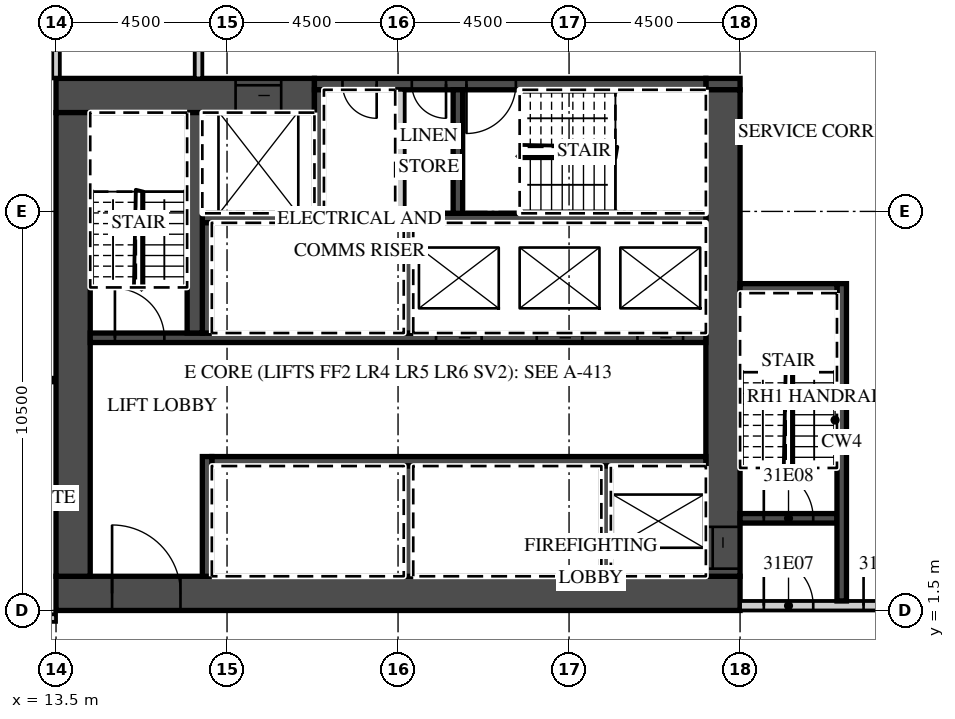
"""IFC4 building model, lengths in metres.
Left out: names, types, materials, properties, quantities, classifications, styles, units other than length and angle.
Written with IfcOpenShell. Run it as: python <this file> out.ifc"""

import sys

from ifc_helpers import new_model, si_unit, direction, frame, frame_2d, origin, place, context, subcontext, project, spatial, rectangle, extrude, element, fill, save


model = new_model("IFC4")
c1 = context("Model", 3, precision=1e-05, world=origin(), true_north=direction((0.0, 1.0)))
c2 = subcontext(c1, "Body", "Model", "MODEL_VIEW")
j1 = project(units=[si_unit("LENGTHUNIT", "METRE"), si_unit("PLANEANGLEUNIT", "RADIAN")], contexts=[c1])
p1 = place(None, origin())
s1 = spatial("IfcSite", under=j1, at=p1, CompositionType="ELEMENT")
p2 = place(p1, origin())
s2 = spatial("IfcBuilding", under=s1, at=p2, CompositionType="ELEMENT")
p3 = place(p2, frame((0.0, 0.0, 137.2)))
s3 = spatial("IfcBuildingStorey", under=s2, at=p3, CompositionType="ELEMENT", Elevation=137.2)
p4 = place(p3, frame((13.5, 15.5, 0.0), z_axis=(0.0, 0.0, 1.0), x_axis=(0.0, 1.0, 0.0)))
e1 = element("IfcWall", 1, at=p4, inside=s3, PredefinedType="PARTITIONING", context=c2, shape_type="SweptSolid", body=[
    extrude(rectangle(XDim=7.162, YDim=0.2, at=frame_2d((3.581, 0.0))), origin(), (0.0, 0.0, 1.0), 3.02),
])
p5 = place(p3, frame((-39.316, 1.3, 0.0), z_axis=(0.0, 0.0, 1.0), x_axis=(1.0, 0.0, 0.0)))
e2 = element("IfcWall", 2, at=p5, inside=s3, PredefinedType="PARTITIONING", context=c2, shape_type="SweptSolid", body=[
    extrude(rectangle(XDim=52.816, YDim=0.2, at=frame_2d((26.408, 0.0))), origin(), (0.0, 0.0, 1.0), 3.02),
])
p6 = place(p5, frame((0.15, 0.0, 0.0)))
e3 = element("IfcOpeningElement", 3, at=p6, cuts=e2, PredefinedType="OPENING", context=c2, shape_type="SweptSolid", body=[
    extrude(rectangle(XDim=0.9, YDim=2.1, at=frame_2d((0.45, 1.05))), frame((0.0, 0.11, 0.0), z_axis=(0.0, -1.0, 0.0), x_axis=(1.0, 0.0, 0.0)), (0.0, 0.0, 1.0), 0.22),
])
p7 = place(p5, frame((8.679, 0.0, 0.0)))
e4 = element("IfcOpeningElement", 4, at=p7, cuts=e2, PredefinedType="OPENING", context=c2, shape_type="SweptSolid", body=[
    extrude(rectangle(XDim=1.2, YDim=2.1, at=frame_2d((0.6, 1.05))), frame((0.0, 0.11, 0.0), z_axis=(0.0, -1.0, 0.0), x_axis=(1.0, 0.0, 0.0)), (0.0, 0.0, 1.0), 0.22),
])
p8 = place(p5, frame((17.678, 0.0, 0.0)))
e5 = element("IfcOpeningElement", 5, at=p8, cuts=e2, PredefinedType="OPENING", context=c2, shape_type="SweptSolid", body=[
    extrude(rectangle(XDim=1.2, YDim=2.1, at=frame_2d((0.6, 1.05))), frame((0.0, 0.11, 0.0), z_axis=(0.0, -1.0, 0.0), x_axis=(1.0, 0.0, 0.0)), (0.0, 0.0, 1.0), 0.22),
])
p9 = place(p5, frame((23.754, 0.0, 0.0)))
e6 = element("IfcOpeningElement", 6, at=p9, cuts=e2, PredefinedType="OPENING", context=c2, shape_type="SweptSolid", body=[
    extrude(rectangle(XDim=1.2, YDim=2.1, at=frame_2d((0.6, 1.05))), frame((0.0, 0.11, 0.0), z_axis=(0.0, -1.0, 0.0), x_axis=(1.0, 0.0, 0.0)), (0.0, 0.0, 1.0), 0.22),
])
p10 = place(p5, frame((30.891, 0.0, 0.0)))
e7 = element("IfcOpeningElement", 7, at=p10, cuts=e2, PredefinedType="OPENING", context=c2, shape_type="SweptSolid", body=[
    extrude(rectangle(XDim=1.0, YDim=2.1, at=frame_2d((0.5, 1.05))), frame((0.0, 0.11, 0.0), z_axis=(0.0, -1.0, 0.0), x_axis=(1.0, 0.0, 0.0)), (0.0, 0.0, 1.0), 0.22),
])
p11 = place(p5, frame((37.741, 0.0, 0.0)))
e8 = element("IfcOpeningElement", 8, at=p11, cuts=e2, PredefinedType="OPENING", context=c2, shape_type="SweptSolid", body=[
    extrude(rectangle(XDim=1.0, YDim=2.1, at=frame_2d((0.5, 1.05))), frame((0.0, 0.11, 0.0), z_axis=(0.0, -1.0, 0.0), x_axis=(1.0, 0.0, 0.0)), (0.0, 0.0, 1.0), 0.22),
])
p12 = place(p5, frame((41.754, 0.0, 0.0)))
e9 = element("IfcOpeningElement", 9, at=p12, cuts=e2, PredefinedType="OPENING", context=c2, shape_type="SweptSolid", body=[
    extrude(rectangle(XDim=1.2, YDim=2.1, at=frame_2d((0.6, 1.05))), frame((0.0, 0.11, 0.0), z_axis=(0.0, -1.0, 0.0), x_axis=(1.0, 0.0, 0.0)), (0.0, 0.0, 1.0), 0.22),
])
p13 = place(p5, frame((48.891, 0.0, 0.0)))
e10 = element("IfcOpeningElement", 10, at=p13, cuts=e2, PredefinedType="OPENING", context=c2, shape_type="SweptSolid", body=[
    extrude(rectangle(XDim=1.0, YDim=2.1, at=frame_2d((0.5, 1.05))), frame((0.0, 0.11, 0.0), z_axis=(0.0, -1.0, 0.0), x_axis=(1.0, 0.0, 0.0)), (0.0, 0.0, 1.0), 0.22),
])
p14 = place(p3, frame((13.5, 1.95, 0.0), z_axis=(0.0, 0.0, 1.0), x_axis=(1.0, 0.0, 0.0)))
e11 = element("IfcWall", 11, at=p14, inside=s3, PredefinedType="SHEAR", context=c2, shape_type="SweptSolid", body=[
    extrude(rectangle(XDim=18.0, YDim=0.9, at=frame_2d((9.0, 0.0))), origin(), (0.0, 0.0, 1.0), 3.02),
])
p15 = place(p14, frame((1.475, 0.0, 0.0)))
e12 = element("IfcOpeningElement", 12, at=p15, cuts=e11, PredefinedType="OPENING", context=c2, shape_type="SweptSolid", body=[
    extrude(rectangle(XDim=1.8, YDim=2.1, at=frame_2d((0.9, 1.05))), frame((0.0, 0.46, 0.0), z_axis=(0.0, -1.0, 0.0), x_axis=(1.0, 0.0, 0.0)), (0.0, 0.0, 1.0), 0.92),
])
p16 = place(p3, frame((13.5, 15.05, 0.0), z_axis=(0.0, 0.0, 1.0), x_axis=(1.0, 0.0, 0.0)))
e13 = element("IfcWall", 13, at=p16, inside=s3, PredefinedType="SHEAR", context=c2, shape_type="SweptSolid", body=[
    extrude(rectangle(XDim=6.8, YDim=0.9, at=frame_2d((3.4, 0.0))), origin(), (0.0, 0.0, 1.0), 3.02),
])
p17 = place(p16, frame((4.725, 0.0, 0.0)))
e14 = element("IfcOpeningElement", 14, at=p17, cuts=e13, PredefinedType="OPENING", context=c2, shape_type="SweptSolid", body=[
    extrude(rectangle(XDim=1.2, YDim=2.1, at=frame_2d((0.6, 1.05))), frame((0.0, 0.46, 0.0), z_axis=(0.0, -1.0, 0.0), x_axis=(1.0, 0.0, 0.0)), (0.0, 0.0, 1.0), 0.92),
])
p18 = place(p3, frame((30.6, 15.35, 0.0), z_axis=(0.0, 0.0, 1.0), x_axis=(1.0, 0.0, 0.0)))
e15 = element("IfcWall", 15, at=p18, inside=s3, PredefinedType="SHEAR", context=c2, shape_type="SweptSolid", body=[
    extrude(rectangle(XDim=0.9, YDim=0.3, at=frame_2d((0.45, 0.0))), origin(), (0.0, 0.0, 1.0), 3.02),
])
p19 = place(p3, frame((20.3, 15.35, 0.0), z_axis=(0.0, 0.0, 1.0), x_axis=(1.0, 0.0, 0.0)))
e16 = element("IfcWall", 16, at=p19, inside=s3, PredefinedType="SHEAR", context=c2, shape_type="SweptSolid", body=[
    extrude(rectangle(XDim=10.3, YDim=0.3, at=frame_2d((5.15, 0.0))), origin(), (0.0, 0.0, 1.0), 3.02),
])
p20 = place(p19, frame((4.0, 0.0, 0.0)))
e17 = element("IfcOpeningElement", 17, at=p20, cuts=e16, PredefinedType="OPENING", context=c2, shape_type="SweptSolid", body=[
    extrude(rectangle(XDim=1.3, YDim=2.1, at=frame_2d((0.65, 1.05))), frame((0.0, 0.16, 0.0), z_axis=(0.0, -1.0, 0.0), x_axis=(1.0, 0.0, 0.0)), (0.0, 0.0, 1.0), 0.32),
])
p21 = place(p19, frame((2.562, 0.0, 0.0)))
e18 = element("IfcOpeningElement", 18, at=p21, cuts=e16, PredefinedType="OPENING", context=c2, shape_type="SweptSolid", body=[
    extrude(rectangle(XDim=0.9, YDim=2.1, at=frame_2d((0.45, 1.05))), frame((0.0, 0.16, 0.0), z_axis=(0.0, -1.0, 0.0), x_axis=(1.0, 0.0, 0.0)), (0.0, 0.0, 1.0), 0.32),
])
p22 = place(p19, frame((0.738, 0.0, 0.0)))
e19 = element("IfcOpeningElement", 19, at=p22, cuts=e16, PredefinedType="OPENING", context=c2, shape_type="SweptSolid", body=[
    extrude(rectangle(XDim=0.9, YDim=2.1, at=frame_2d((0.45, 1.05))), frame((0.0, 0.16, 0.0), z_axis=(0.0, -1.0, 0.0), x_axis=(1.0, 0.0, 0.0)), (0.0, 0.0, 1.0), 0.32),
])
p23 = place(p3, frame((31.05, 2.4, 0.0), z_axis=(0.0, 0.0, 1.0), x_axis=(0.0, 1.0, 0.0)))
e20 = element("IfcWall", 20, at=p23, inside=s3, PredefinedType="SHEAR", context=c2, shape_type="SweptSolid", body=[
    extrude(rectangle(XDim=12.8, YDim=0.9, at=frame_2d((6.4, 0.0))), origin(), (0.0, 0.0, 1.0), 3.02),
])
p24 = place(p23, frame((0.2, 0.0, 0.0)))
e21 = element("IfcOpeningElement", 21, at=p24, cuts=e20, PredefinedType="OPENING", context=c2, shape_type="SweptSolid", body=[
    extrude(rectangle(XDim=1.1, YDim=2.1, at=frame_2d((0.55, 1.05))), frame((0.0, 0.46, 0.0), z_axis=(0.0, -1.0, 0.0), x_axis=(1.0, 0.0, 0.0)), (0.0, 0.0, 1.0), 0.92),
])
p25 = place(p3, frame((13.95, 2.4, 0.0), z_axis=(0.0, 0.0, 1.0), x_axis=(0.0, 1.0, 0.0)))
e22 = element("IfcWall", 22, at=p25, inside=s3, PredefinedType="SHEAR", context=c2, shape_type="SweptSolid", body=[
    extrude(rectangle(XDim=12.2, YDim=0.9, at=frame_2d((6.1, 0.0))), origin(), (0.0, 0.0, 1.0), 3.02),
])
p26 = place(p3, frame((17.6, 5.425, 0.0), z_axis=(0.0, 0.0, 1.0), x_axis=(1.0, 0.0, 0.0)))
e23 = element("IfcWall", 23, at=p26, inside=s3, PredefinedType="SHEAR", context=c2, shape_type="SweptSolid", body=[
    extrude(rectangle(XDim=13.0, YDim=0.25, at=frame_2d((6.5, 0.0))), origin(), (0.0, 0.0, 1.0), 3.02),
])
p27 = place(p3, frame((17.475, 2.4, 0.0), z_axis=(0.0, 0.0, 1.0), x_axis=(0.0, 1.0, 0.0)))
e24 = element("IfcWall", 24, at=p27, inside=s3, PredefinedType="SHEAR", context=c2, shape_type="SweptSolid", body=[
    extrude(rectangle(XDim=3.15, YDim=0.25, at=frame_2d((1.575, 0.0))), origin(), (0.0, 0.0, 1.0), 3.02),
])
for number, where, z_axis, x_axis in (
    (25, (27.975, 2.4, 0.0), (0.0, 0.0, 1.0), (0.0, 1.0, 0.0)),
    (26, (22.775, 2.4, 0.0), (0.0, 0.0, 1.0), (0.0, 1.0, 0.0)),
):
    element("IfcWall", number, at=place(p3, frame(where, z_axis=z_axis, x_axis=x_axis)), inside=s3, PredefinedType="SHEAR", context=c2, shape_type="SweptSolid", body=[
        extrude(rectangle(XDim=2.9, YDim=0.25, at=frame_2d((1.45, 0.0))), origin(), (0.0, 0.0, 1.0), 3.02),
    ])
p28 = place(p3, frame((14.4, 8.675, 0.0), z_axis=(0.0, 0.0, 1.0), x_axis=(1.0, 0.0, 0.0)))
e27 = element("IfcWall", 27, at=p28, inside=s3, PredefinedType="SHEAR", context=c2, shape_type="SweptSolid", body=[
    extrude(rectangle(XDim=16.2, YDim=0.25, at=frame_2d((8.1, 0.0))), origin(), (0.0, 0.0, 1.0), 3.02),
])
p29 = place(p28, frame((14.4, 0.0, 0.0)))
e28 = element("IfcOpeningElement", 28, at=p29, cuts=e27, PredefinedType="OPENING", context=c2, shape_type="SweptSolid", body=[
    extrude(rectangle(XDim=1.2, YDim=2.1, at=frame_2d((0.6, 1.05))), frame((0.0, 0.135, 0.0), z_axis=(0.0, -1.0, 0.0), x_axis=(1.0, 0.0, 0.0)), (0.0, 0.0, 1.0), 0.27),
])
p30 = place(p28, frame((11.75, 0.0, 0.0)))
e29 = element("IfcOpeningElement", 29, at=p30, cuts=e27, PredefinedType="OPENING", context=c2, shape_type="SweptSolid", body=[
    extrude(rectangle(XDim=1.2, YDim=2.1, at=frame_2d((0.6, 1.05))), frame((0.0, 0.135, 0.0), z_axis=(0.0, -1.0, 0.0), x_axis=(1.0, 0.0, 0.0)), (0.0, 0.0, 1.0), 0.27),
])
p31 = place(p28, frame((9.1, 0.0, 0.0)))
e30 = element("IfcOpeningElement", 30, at=p31, cuts=e27, PredefinedType="OPENING", context=c2, shape_type="SweptSolid", body=[
    extrude(rectangle(XDim=1.2, YDim=2.1, at=frame_2d((0.6, 1.05))), frame((0.0, 0.135, 0.0), z_axis=(0.0, -1.0, 0.0), x_axis=(1.0, 0.0, 0.0)), (0.0, 0.0, 1.0), 0.27),
])
p32 = place(p28, frame((0.65, 0.0, 0.0)))
e31 = element("IfcOpeningElement", 31, at=p32, cuts=e27, PredefinedType="OPENING", context=c2, shape_type="SweptSolid", body=[
    extrude(rectangle(XDim=1.3, YDim=2.1, at=frame_2d((0.65, 1.05))), frame((0.0, 0.135, 0.0), z_axis=(0.0, -1.0, 0.0), x_axis=(1.0, 0.0, 0.0)), (0.0, 0.0, 1.0), 0.27),
])
p33 = place(p3, frame((17.35, 11.825, 0.0), z_axis=(0.0, 0.0, 1.0), x_axis=(1.0, 0.0, 0.0)))
e32 = element("IfcWall", 32, at=p33, inside=s3, PredefinedType="SHEAR", context=c2, shape_type="SweptSolid", body=[
    extrude(rectangle(XDim=13.25, YDim=0.25, at=frame_2d((6.625, 0.0))), origin(), (0.0, 0.0, 1.0), 3.02),
])
for number, where, z_axis, x_axis in (
    (33, (17.475, 8.8, 0.0), (0.0, 0.0, 1.0), (0.0, 1.0, 0.0)),
    (34, (22.775, 8.8, 0.0), (0.0, 0.0, 1.0), (0.0, 1.0, 0.0)),
):
    element("IfcWall", number, at=place(p3, frame(where, z_axis=z_axis, x_axis=x_axis)), inside=s3, PredefinedType="SHEAR", context=c2, shape_type="SweptSolid", body=[
        extrude(rectangle(XDim=2.9, YDim=0.25, at=frame_2d((1.45, 0.0))), origin(), (0.0, 0.0, 1.0), 3.02),
    ])
p34 = place(p3, frame((17.15, 8.8, 0.0), z_axis=(0.0, 0.0, 1.0), x_axis=(0.0, 1.0, 0.0)))
e35 = element("IfcWall", 35, at=p34, inside=s3, PredefinedType="SHEAR", context=c2, shape_type="SweptSolid", body=[
    extrude(rectangle(XDim=5.8, YDim=0.4, at=frame_2d((2.9, 0.0))), origin(), (0.0, 0.0, 1.0), 3.02),
])
for number, where, z_axis, x_axis in (
    (36, (20.425, 11.95, 0.0), (0.0, 0.0, 1.0), (0.0, 1.0, 0.0)),
    (37, (24.075, 11.95, 0.0), (0.0, 0.0, 1.0), (0.0, 1.0, 0.0)),
):
    element("IfcWall", number, at=place(p3, frame(where, z_axis=z_axis, x_axis=x_axis)), inside=s3, PredefinedType="SHEAR", context=c2, shape_type="SweptSolid", body=[
        extrude(rectangle(XDim=3.25, YDim=0.25, at=frame_2d((1.625, 0.0))), origin(), (0.0, 0.0, 1.0), 3.02),
    ])
p35 = place(p3, frame((22.55, 11.95, 0.0), z_axis=(0.0, 0.0, 1.0), x_axis=(0.0, 1.0, 0.0)))
e38 = element("IfcWall", 38, at=p35, inside=s3, PredefinedType="PARTITIONING", context=c2, shape_type="SweptSolid", body=[
    extrude(rectangle(XDim=3.25, YDim=0.25, at=frame_2d((1.625, 0.0))), origin(), (0.0, 0.0, 1.0), 3.02),
])
p36 = place(p3, frame((31.5, 1.625, 0.0), z_axis=(0.0, 0.0, 1.0), x_axis=(1.0, 0.0, 0.0)))
e39 = element("IfcWall", 39, at=p36, inside=s3, PredefinedType="PARTITIONING", context=c2, shape_type="SweptSolid", body=[
    extrude(rectangle(XDim=15.65, YDim=0.25, at=frame_2d((7.825, 0.0))), origin(), (0.0, 0.0, 1.0), 3.02),
])
p37 = place(p36, frame((0.625, 0.0, 0.0)))
e40 = element("IfcOpeningElement", 40, at=p37, cuts=e39, PredefinedType="OPENING", context=c2, shape_type="SweptSolid", body=[
    extrude(rectangle(XDim=1.3, YDim=2.1, at=frame_2d((0.65, 1.05))), frame((0.0, 0.135, 0.0), z_axis=(0.0, -1.0, 0.0), x_axis=(1.0, 0.0, 0.0)), (0.0, 0.0, 1.0), 0.27),
])
p38 = place(p36, frame((3.25, 0.0, 0.0)))
e41 = element("IfcOpeningElement", 41, at=p38, cuts=e39, PredefinedType="OPENING", context=c2, shape_type="SweptSolid", body=[
    extrude(rectangle(XDim=1.1, YDim=2.1, at=frame_2d((0.55, 1.05))), frame((0.0, 0.135, 0.0), z_axis=(0.0, -1.0, 0.0), x_axis=(1.0, 0.0, 0.0)), (0.0, 0.0, 1.0), 0.27),
])
p39 = place(p3, frame((31.5, 3.925, 0.0), z_axis=(0.0, 0.0, 1.0), x_axis=(1.0, 0.0, 0.0)))
e42 = element("IfcWall", 42, at=p39, inside=s3, PredefinedType="SHEAR", context=c2, shape_type="SweptSolid", body=[
    extrude(rectangle(XDim=2.55, YDim=0.25, at=frame_2d((1.275, 0.0))), origin(), (0.0, 0.0, 1.0), 3.02),
])
p40 = place(p39, frame((0.625, 0.0, 0.0)))
e43 = element("IfcOpeningElement", 43, at=p40, cuts=e42, PredefinedType="OPENING", context=c2, shape_type="SweptSolid", body=[
    extrude(rectangle(XDim=1.3, YDim=2.1, at=frame_2d((0.65, 1.05))), frame((0.0, 0.135, 0.0), z_axis=(0.0, -1.0, 0.0), x_axis=(1.0, 0.0, 0.0)), (0.0, 0.0, 1.0), 0.27),
])
p41 = place(p3, frame((34.175, 1.75, 0.0), z_axis=(0.0, 0.0, 1.0), x_axis=(0.0, 1.0, 0.0)))
e44 = element("IfcWall", 44, at=p41, inside=s3, PredefinedType="SHEAR", context=c2, shape_type="SweptSolid", body=[
    extrude(rectangle(XDim=8.35, YDim=0.25, at=frame_2d((4.175, 0.0))), origin(), (0.0, 0.0, 1.0), 3.02),
])
p42 = place(p3, frame((31.5, 9.975, 0.0), z_axis=(0.0, 0.0, 1.0), x_axis=(1.0, 0.0, 0.0)))
e45 = element("IfcWall", 45, at=p42, inside=s3, PredefinedType="SHEAR", context=c2, shape_type="SweptSolid", body=[
    extrude(rectangle(XDim=2.55, YDim=0.25, at=frame_2d((1.275, 0.0))), origin(), (0.0, 0.0, 1.0), 3.02),
])
p43 = place(p3, frame((17.25, 15.5, 0.0), z_axis=(0.0, 0.0, 1.0), x_axis=(0.0, 1.0, 0.0)))
e46 = element("IfcWall", 46, at=p43, inside=s3, PredefinedType="PARTITIONING", context=c2, shape_type="SweptSolid", body=[
    extrude(rectangle(XDim=2.2, YDim=0.2, at=frame_2d((1.1, 0.0))), origin(), (0.0, 0.0, 1.0), 3.02),
])
p44 = place(p29, origin())
e47 = element("IfcDoor", 47, at=p44, inside=s3, OperationType="SLIDING_TO_LEFT", PredefinedType="DOOR", context=c2, shape_type="SweptSolid", body=[
    extrude(rectangle(XDim=1.2, YDim=2.1, at=frame_2d((0.6, 1.05))), frame((0.0, 0.025, 0.0), z_axis=(0.0, -1.0, 0.0), x_axis=(1.0, 0.0, 0.0)), (0.0, 0.0, 1.0), 0.05),
])
fill(e28, e47)
p45 = place(p30, origin())
e48 = element("IfcDoor", 48, at=p45, inside=s3, OperationType="SLIDING_TO_RIGHT", PredefinedType="DOOR", context=c2, shape_type="SweptSolid", body=[
    extrude(rectangle(XDim=1.2, YDim=2.1, at=frame_2d((0.6, 1.05))), frame((0.0, 0.025, 0.0), z_axis=(0.0, -1.0, 0.0), x_axis=(1.0, 0.0, 0.0)), (0.0, 0.0, 1.0), 0.05),
])
fill(e29, e48)
p46 = place(p31, origin())
e49 = element("IfcDoor", 49, at=p46, inside=s3, OperationType="SLIDING_TO_RIGHT", PredefinedType="DOOR", context=c2, shape_type="SweptSolid", body=[
    extrude(rectangle(XDim=1.2, YDim=2.1, at=frame_2d((0.6, 1.05))), frame((0.0, 0.025, 0.0), z_axis=(0.0, -1.0, 0.0), x_axis=(1.0, 0.0, 0.0)), (0.0, 0.0, 1.0), 0.05),
])
fill(e30, e49)
p47 = place(p17, origin())
e50 = element("IfcDoor", 50, at=p47, inside=s3, OperationType="SLIDING_TO_LEFT", PredefinedType="DOOR", context=c2, shape_type="SweptSolid", body=[
    extrude(rectangle(XDim=1.2, YDim=2.1, at=frame_2d((0.6, 1.05))), frame((0.0, 0.025, 0.0), z_axis=(0.0, -1.0, 0.0), x_axis=(1.0, 0.0, 0.0)), (0.0, 0.0, 1.0), 0.05),
])
fill(e14, e50)
p48 = place(p24, origin())
e51 = element("IfcDoor", 51, at=p48, inside=s3, OperationType="SLIDING_TO_LEFT", PredefinedType="DOOR", context=c2, shape_type="SweptSolid", body=[
    extrude(rectangle(XDim=1.1, YDim=2.1, at=frame_2d((0.55, 1.05))), frame((0.0, 0.025, 0.0), z_axis=(0.0, -1.0, 0.0), x_axis=(1.0, 0.0, 0.0)), (0.0, 0.0, 1.0), 0.05),
])
fill(e21, e51)
p49 = place(p15, origin())
e52 = element("IfcDoor", 52, at=p49, inside=s3, OperationType="DOUBLE_DOOR_DOUBLE_SWING", PredefinedType="DOOR", context=c2, shape_type="SweptSolid", body=[
    extrude(rectangle(XDim=1.8, YDim=2.1, at=frame_2d((0.9, 1.05))), frame((0.0, 0.025, 0.0), z_axis=(0.0, -1.0, 0.0), x_axis=(1.0, 0.0, 0.0)), (0.0, 0.0, 1.0), 0.05),
])
fill(e12, e52)
p50 = place(p37, origin())
e53 = element("IfcDoor", 53, at=p50, inside=s3, OperationType="SINGLE_SWING_LEFT", PredefinedType="DOOR", context=c2, shape_type="SweptSolid", body=[
    extrude(rectangle(XDim=1.3, YDim=2.1, at=frame_2d((0.65, 1.05))), frame((0.0, 0.025, 0.0), z_axis=(0.0, -1.0, 0.0), x_axis=(1.0, 0.0, 0.0)), (0.0, 0.0, 1.0), 0.05),
])
fill(e40, e53)
p51 = place(p40, origin())
e54 = element("IfcDoor", 54, at=p51, inside=s3, OperationType="SINGLE_SWING_LEFT", PredefinedType="DOOR", context=c2, shape_type="SweptSolid", body=[
    extrude(rectangle(XDim=1.3, YDim=2.1, at=frame_2d((0.65, 1.05))), frame((0.0, 0.025, 0.0), z_axis=(0.0, -1.0, 0.0), x_axis=(1.0, 0.0, 0.0)), (0.0, 0.0, 1.0), 0.05),
])
fill(e43, e54)
p52 = place(p38, origin())
e55 = element("IfcDoor", 55, at=p52, inside=s3, OperationType="SINGLE_SWING_LEFT", PredefinedType="DOOR", context=c2, shape_type="SweptSolid", body=[
    extrude(rectangle(XDim=1.1, YDim=2.1, at=frame_2d((0.55, 1.05))), frame((0.0, 0.025, 0.0), z_axis=(0.0, -1.0, 0.0), x_axis=(1.0, 0.0, 0.0)), (0.0, 0.0, 1.0), 0.05),
])
fill(e41, e55)
p53 = place(p32, origin())
e56 = element("IfcDoor", 56, at=p53, inside=s3, OperationType="SINGLE_SWING_LEFT", PredefinedType="DOOR", context=c2, shape_type="SweptSolid", body=[
    extrude(rectangle(XDim=1.3, YDim=2.1, at=frame_2d((0.65, 1.05))), frame((0.0, 0.025, 0.0), z_axis=(0.0, -1.0, 0.0), x_axis=(1.0, 0.0, 0.0)), (0.0, 0.0, 1.0), 0.05),
])
fill(e31, e56)
p54 = place(p20, origin())
e57 = element("IfcDoor", 57, at=p54, inside=s3, OperationType="SINGLE_SWING_LEFT", PredefinedType="DOOR", context=c2, shape_type="SweptSolid", body=[
    extrude(rectangle(XDim=1.3, YDim=2.1, at=frame_2d((0.65, 1.05))), frame((0.0, 0.025, 0.0), z_axis=(0.0, -1.0, 0.0), x_axis=(1.0, 0.0, 0.0)), (0.0, 0.0, 1.0), 0.05),
])
fill(e17, e57)
p55 = place(p21, origin())
e58 = element("IfcDoor", 58, at=p55, inside=s3, OperationType="SINGLE_SWING_RIGHT", PredefinedType="DOOR", context=c2, shape_type="SweptSolid", body=[
    extrude(rectangle(XDim=0.9, YDim=2.1, at=frame_2d((0.45, 1.05))), frame((0.0, 0.025, 0.0), z_axis=(0.0, -1.0, 0.0), x_axis=(1.0, 0.0, 0.0)), (0.0, 0.0, 1.0), 0.05),
])
fill(e18, e58)
p56 = place(p22, origin())
e59 = element("IfcDoor", 59, at=p56, inside=s3, OperationType="SINGLE_SWING_RIGHT", PredefinedType="DOOR", context=c2, shape_type="SweptSolid", body=[
    extrude(rectangle(XDim=0.9, YDim=2.1, at=frame_2d((0.45, 1.05))), frame((0.0, 0.025, 0.0), z_axis=(0.0, -1.0, 0.0), x_axis=(1.0, 0.0, 0.0)), (0.0, 0.0, 1.0), 0.05),
])
fill(e19, e59)
save(model, sys.argv[1])
